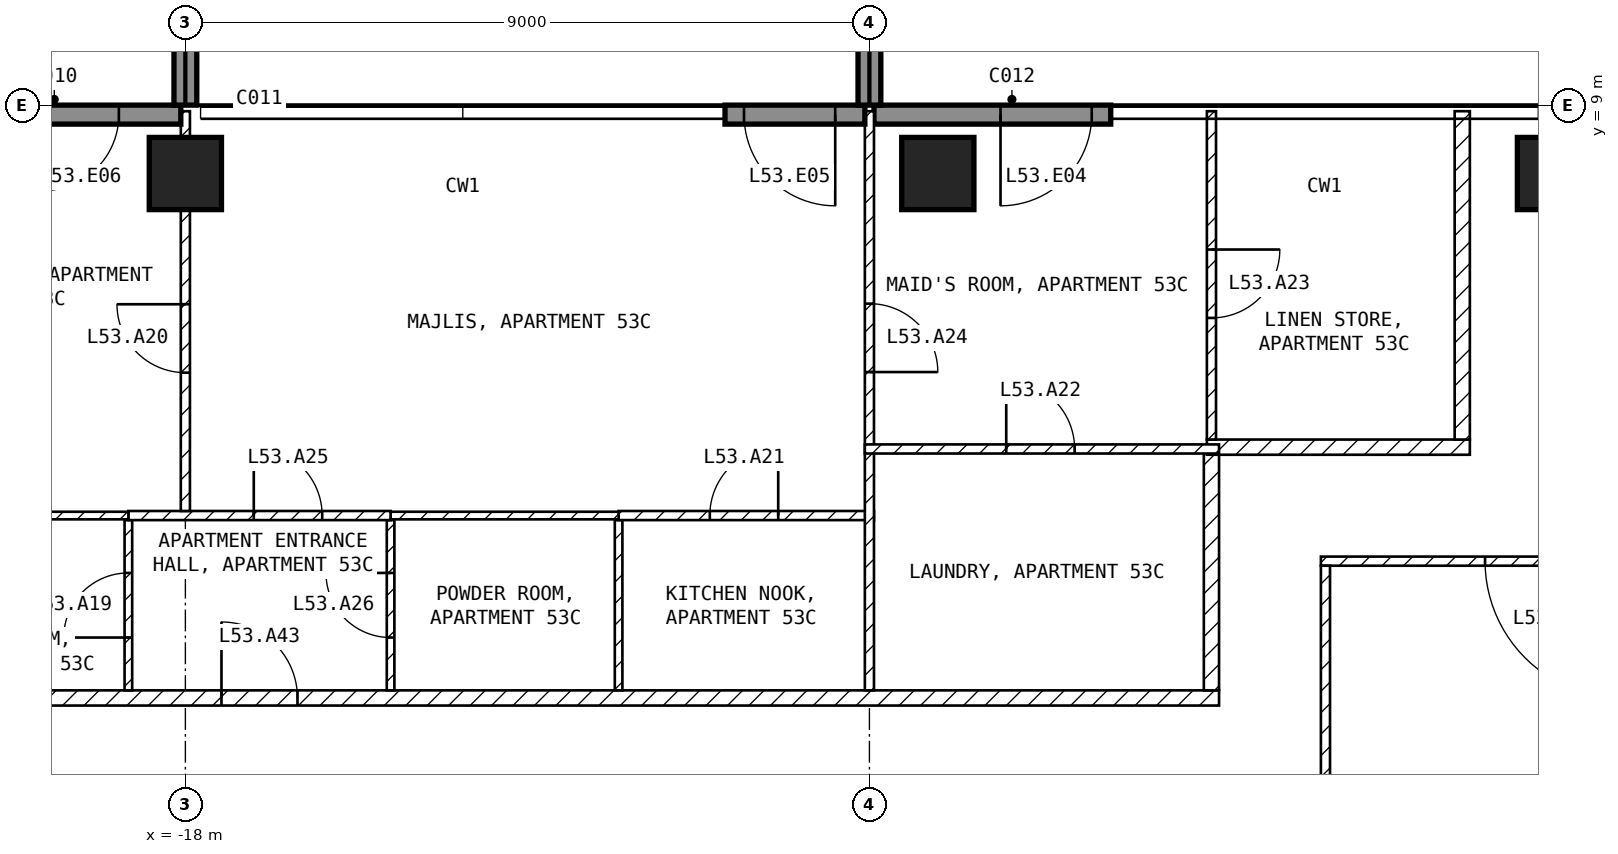
"""IFC4 building model, lengths in metres.
Left out: names, types, materials, properties, quantities, classifications, styles, units other than length and angle.
Written with IfcOpenShell. Run it as: python <this file> out.ifc"""

import sys

from ifc_helpers import new_model, si_unit, direction, frame, frame_2d, origin, origin_2d, place, context, subcontext, project, spatial, rectangle, extrude, element, fill, save


model = new_model("IFC4")
c1 = context("Model", 3, precision=1e-05, world=origin(), true_north=direction((0.0, 1.0)))
c2 = subcontext(c1, "Body", "Model", "MODEL_VIEW")
j1 = project(units=[si_unit("LENGTHUNIT", "METRE"), si_unit("PLANEANGLEUNIT", "RADIAN")], contexts=[c1])
p1 = place(None, origin())
s1 = spatial("IfcSite", under=j1, at=p1, CompositionType="ELEMENT")
p2 = place(p1, origin())
s2 = spatial("IfcBuilding", under=s1, at=p2, CompositionType="ELEMENT")
p3 = place(p2, frame((0.0, 0.0, 212.1)))
s3 = spatial("IfcBuildingStorey", under=s2, at=p3, CompositionType="ELEMENT", Elevation=212.1)
for number, where, z_axis, x_axis in (
    (1, (-18.0, 8.1, -0.25), (0.0, 0.0, 1.0), (1.0, 0.0, 0.0)),
    (2, (-8.1, 8.1, -0.25), (0.0, 0.0, 1.0), (1.0, 0.0, 0.0)),
    (3, (0.0, 8.1, -0.25), (0.0, 0.0, 1.0), (1.0, 0.0, 0.0)),
):
    element("IfcColumn", number, at=place(p3, frame(where, z_axis=z_axis, x_axis=x_axis)), inside=s3, PredefinedType="COLUMN", context=c2, shape_type="SweptSolid", body=[
        extrude(rectangle(XDim=0.95, YDim=0.95, at=origin_2d()), origin(), (0.0, 0.0, 1.0), 3.5),
    ])
p4 = place(p3, frame((-5.825, 8.875, 0.0), z_axis=(0.0, 0.0, 1.0), x_axis=(-1.0, 0.0, 0.0)))
e4 = element("IfcWall", 4, at=p4, inside=s3, PredefinedType="SOLIDWALL", context=c2, shape_type="SweptSolid", body=[
    extrude(rectangle(XDim=3.115, YDim=0.25, at=frame_2d((1.558, 0.0))), origin(), (0.0, 0.0, 1.0), 3.25),
])
p5 = place(p4, frame((0.25, 0.0, 0.0)))
e5 = element("IfcOpeningElement", 5, at=p5, cuts=e4, PredefinedType="OPENING", context=c2, shape_type="SweptSolid", body=[
    extrude(rectangle(XDim=1.2, YDim=2.4, at=frame_2d((0.6, 1.2))), frame((0.0, 0.135, 0.0), z_axis=(0.0, -1.0, 0.0), x_axis=(1.0, 0.0, 0.0)), (0.0, 0.0, 1.0), 0.27),
])
p6 = place(p3, frame((-9.06, 8.875, 0.0), z_axis=(0.0, 0.0, 1.0), x_axis=(-1.0, 0.0, 0.0)))
e6 = element("IfcWall", 6, at=p6, inside=s3, PredefinedType="SOLIDWALL", context=c2, shape_type="SweptSolid", body=[
    extrude(rectangle(XDim=1.84, YDim=0.25, at=frame_2d((0.92, 0.0))), origin(), (0.0, 0.0, 1.0), 3.25),
])
p7 = place(p6, frame((0.39, 0.0, 0.0)))
e7 = element("IfcOpeningElement", 7, at=p7, cuts=e6, PredefinedType="OPENING", context=c2, shape_type="SweptSolid", body=[
    extrude(rectangle(XDim=1.2, YDim=2.4, at=frame_2d((0.6, 1.2))), frame((0.0, 0.135, 0.0), z_axis=(0.0, -1.0, 0.0), x_axis=(1.0, 0.0, 0.0)), (0.0, 0.0, 1.0), 0.27),
])
p8 = place(p3, frame((-18.06, 8.875, 0.0), z_axis=(0.0, 0.0, 1.0), x_axis=(-1.0, 0.0, 0.0)))
e8 = element("IfcWall", 8, at=p8, inside=s3, PredefinedType="SOLIDWALL", context=c2, shape_type="SweptSolid", body=[
    extrude(rectangle(XDim=3.115, YDim=0.25, at=frame_2d((1.558, 0.0))), origin(), (0.0, 0.0, 1.0), 3.25),
])
p9 = place(p8, frame((0.815, 0.0, 0.0)))
e9 = element("IfcOpeningElement", 9, at=p9, cuts=e8, PredefinedType="OPENING", context=c2, shape_type="SweptSolid", body=[
    extrude(rectangle(XDim=1.0, YDim=2.4, at=frame_2d((0.5, 1.2))), frame((0.0, 0.135, 0.0), z_axis=(0.0, -1.0, 0.0), x_axis=(1.0, 0.0, 0.0)), (0.0, 0.0, 1.0), 0.27),
])
for number, where, z_axis, x_axis in (
    (10, (-18.0, 9.0, 0.0), (0.0, 0.0, 1.0), (0.0, 1.0, 0.0)),
    (11, (-9.0, 9.0, 0.0), (0.0, 0.0, 1.0), (0.0, 1.0, 0.0)),
):
    element("IfcWall", number, at=place(p3, frame(where, z_axis=z_axis, x_axis=x_axis)), inside=s3, PredefinedType="SOLIDWALL", context=c2, shape_type="SweptSolid", body=[
        extrude(rectangle(XDim=2.7, YDim=0.3, at=frame_2d((1.35, 0.0))), origin(), (0.0, 0.0, 1.0), 3.25),
    ])
p10 = place(p3, frame((3.06, 3.0, 0.0), z_axis=(0.0, 0.0, 1.0), x_axis=(-1.0, 0.0, 0.0)))
e12 = element("IfcWall", 12, at=p10, inside=s3, PredefinedType="PARTITIONING", context=c2, shape_type="SweptSolid", body=[
    extrude(rectangle(XDim=6.12, YDim=0.12, at=frame_2d((3.06, 0.0))), origin(), (0.0, 0.0, 1.0), 3.25),
])
p11 = place(p10, frame((2.16, 0.0, 0.0)))
e13 = element("IfcOpeningElement", 13, at=p11, cuts=e12, PredefinedType="OPENING", context=c2, shape_type="SweptSolid", body=[
    extrude(rectangle(XDim=1.8, YDim=2.1, at=frame_2d((0.9, 1.05))), frame((0.0, 0.07, 0.0), z_axis=(0.0, -1.0, 0.0), x_axis=(1.0, 0.0, 0.0)), (0.0, 0.0, 1.0), 0.14),
])
p12 = place(p3, frame((-3.0, 2.94, 0.0), z_axis=(0.0, 0.0, 1.0), x_axis=(0.0, -1.0, 0.0)))
e14 = element("IfcWall", 14, at=p12, inside=s3, PredefinedType="PARTITIONING", context=c2, shape_type="SweptSolid", body=[
    extrude(rectangle(XDim=5.88, YDim=0.12, at=frame_2d((2.94, 0.0))), origin(), (0.0, 0.0, 1.0), 3.25),
])
p13 = place(p3, frame((-21.6, 1.2, 0.0), z_axis=(0.0, 0.0, 1.0), x_axis=(1.0, 0.0, 0.0)))
e15 = element("IfcWall", 15, at=p13, inside=s3, PredefinedType="PARTITIONING", context=c2, shape_type="SweptSolid", body=[
    extrude(rectangle(XDim=17.2, YDim=0.2, at=frame_2d((8.6, 0.0))), origin(), (0.0, 0.0, 1.0), 3.25),
])
p14 = place(p13, frame((4.075, 0.0, 0.0)))
e16 = element("IfcOpeningElement", 16, at=p14, cuts=e15, PredefinedType="OPENING", context=c2, shape_type="SweptSolid", body=[
    extrude(rectangle(XDim=1.0, YDim=2.1, at=frame_2d((0.5, 1.05))), frame((0.0, 0.11, 0.0), z_axis=(0.0, -1.0, 0.0), x_axis=(1.0, 0.0, 0.0)), (0.0, 0.0, 1.0), 0.22),
])
p15 = place(p3, frame((-4.5, 1.3, 0.0), z_axis=(0.0, 0.0, 1.0), x_axis=(0.0, 1.0, 0.0)))
e17 = element("IfcWall", 17, at=p15, inside=s3, PredefinedType="PARTITIONING", context=c2, shape_type="SweptSolid", body=[
    extrude(rectangle(XDim=3.116, YDim=0.2, at=frame_2d((1.558, 0.0))), origin(), (0.0, 0.0, 1.0), 3.25),
])
p16 = place(p3, frame((-4.56, 4.5, 0.0), z_axis=(0.0, 0.0, 1.0), x_axis=(1.0, 0.0, 0.0)))
e18 = element("IfcWall", 18, at=p16, inside=s3, PredefinedType="PARTITIONING", context=c2, shape_type="SweptSolid", body=[
    extrude(rectangle(XDim=3.46, YDim=0.2, at=frame_2d((1.73, 0.0))), origin(), (0.0, 0.0, 1.0), 3.25),
])
p17 = place(p3, frame((-1.2, 4.6, 0.0), z_axis=(0.0, 0.0, 1.0), x_axis=(0.0, 1.0, 0.0)))
e19 = element("IfcWall", 19, at=p17, inside=s3, PredefinedType="PARTITIONING", context=c2, shape_type="SweptSolid", body=[
    extrude(rectangle(XDim=4.32, YDim=0.2, at=frame_2d((2.16, 0.0))), origin(), (0.0, 0.0, 1.0), 3.25),
])
p18 = place(p3, frame((-12.3, 1.3, 0.0), z_axis=(0.0, 0.0, 1.0), x_axis=(0.0, 1.0, 0.0)))
e20 = element("IfcWall", 20, at=p18, inside=s3, PredefinedType="PARTITIONING", context=c2, shape_type="SweptSolid", body=[
    extrude(rectangle(XDim=2.24, YDim=0.1, at=frame_2d((1.12, 0.0))), origin(), (0.0, 0.0, 1.0), 3.25),
])
p19 = place(p3, frame((-12.3, 3.6, 0.0), z_axis=(0.0, 0.0, 1.0), x_axis=(1.0, 0.0, 0.0)))
e21 = element("IfcWall", 21, at=p19, inside=s3, PredefinedType="PARTITIONING", context=c2, shape_type="SweptSolid", body=[
    extrude(rectangle(XDim=3.36, YDim=0.12, at=frame_2d((1.68, 0.0))), origin(), (0.0, 0.0, 1.0), 3.25),
])
p20 = place(p19, frame((1.2, 0.0, 0.0)))
e22 = element("IfcOpeningElement", 22, at=p20, cuts=e21, PredefinedType="OPENING", context=c2, shape_type="SweptSolid", body=[
    extrude(rectangle(XDim=0.9, YDim=2.1, at=frame_2d((0.45, 1.05))), frame((0.0, 0.07, 0.0), z_axis=(0.0, -1.0, 0.0), x_axis=(1.0, 0.0, 0.0)), (0.0, 0.0, 1.0), 0.14),
])
p21 = place(p3, frame((-9.0, 8.92, 0.0), z_axis=(0.0, 0.0, 1.0), x_axis=(0.0, -1.0, 0.0)))
e23 = element("IfcWall", 23, at=p21, inside=s3, PredefinedType="PARTITIONING", context=c2, shape_type="SweptSolid", body=[
    extrude(rectangle(XDim=7.62, YDim=0.12, at=frame_2d((3.81, 0.0))), origin(), (0.0, 0.0, 1.0), 3.25),
])
p22 = place(p21, frame((2.532, 0.0, 0.0)))
e24 = element("IfcOpeningElement", 24, at=p22, cuts=e23, PredefinedType="OPENING", context=c2, shape_type="SweptSolid", body=[
    extrude(rectangle(XDim=0.9, YDim=2.1, at=frame_2d((0.45, 1.05))), frame((0.0, 0.07, 0.0), z_axis=(0.0, -1.0, 0.0), x_axis=(1.0, 0.0, 0.0)), (0.0, 0.0, 1.0), 0.14),
])
p23 = place(p3, frame((-15.3, 1.3, 0.0), z_axis=(0.0, 0.0, 1.0), x_axis=(0.0, 1.0, 0.0)))
e25 = element("IfcWall", 25, at=p23, inside=s3, PredefinedType="PARTITIONING", context=c2, shape_type="SweptSolid", body=[
    extrude(rectangle(XDim=2.24, YDim=0.1, at=frame_2d((1.12, 0.0))), origin(), (0.0, 0.0, 1.0), 3.25),
])
p24 = place(p23, frame((0.695, 0.0, 0.0)))
e26 = element("IfcOpeningElement", 26, at=p24, cuts=e25, PredefinedType="OPENING", context=c2, shape_type="SweptSolid", body=[
    extrude(rectangle(XDim=0.85, YDim=2.1, at=frame_2d((0.425, 1.05))), frame((0.0, 0.06, 0.0), z_axis=(0.0, -1.0, 0.0), x_axis=(1.0, 0.0, 0.0)), (0.0, 0.0, 1.0), 0.12),
])
p25 = place(p3, frame((-15.3, 3.6, 0.0), z_axis=(0.0, 0.0, 1.0), x_axis=(1.0, 0.0, 0.0)))
e27 = element("IfcWall", 27, at=p25, inside=s3, PredefinedType="PARTITIONING", context=c2, shape_type="SweptSolid", body=[
    extrude(rectangle(XDim=3.0, YDim=0.1, at=frame_2d((1.5, 0.0))), origin(), (0.0, 0.0, 1.0), 3.25),
])
p26 = place(p3, frame((-18.75, 1.3, 0.0), z_axis=(0.0, 0.0, 1.0), x_axis=(0.0, 1.0, 0.0)))
e28 = element("IfcWall", 28, at=p26, inside=s3, PredefinedType="PARTITIONING", context=c2, shape_type="SweptSolid", body=[
    extrude(rectangle(XDim=2.24, YDim=0.1, at=frame_2d((1.12, 0.0))), origin(), (0.0, 0.0, 1.0), 3.25),
])
p27 = place(p26, frame((0.695, 0.0, 0.0)))
e29 = element("IfcOpeningElement", 29, at=p27, cuts=e28, PredefinedType="OPENING", context=c2, shape_type="SweptSolid", body=[
    extrude(rectangle(XDim=0.85, YDim=2.1, at=frame_2d((0.425, 1.05))), frame((0.0, 0.06, 0.0), z_axis=(0.0, -1.0, 0.0), x_axis=(1.0, 0.0, 0.0)), (0.0, 0.0, 1.0), 0.12),
])
p28 = place(p3, frame((-18.75, 3.6, 0.0), z_axis=(0.0, 0.0, 1.0), x_axis=(1.0, 0.0, 0.0)))
e30 = element("IfcWall", 30, at=p28, inside=s3, PredefinedType="PARTITIONING", context=c2, shape_type="SweptSolid", body=[
    extrude(rectangle(XDim=3.45, YDim=0.12, at=frame_2d((1.725, 0.0))), origin(), (0.0, 0.0, 1.0), 3.25),
])
p29 = place(p28, frame((1.65, 0.0, 0.0)))
e31 = element("IfcOpeningElement", 31, at=p29, cuts=e30, PredefinedType="OPENING", context=c2, shape_type="SweptSolid", body=[
    extrude(rectangle(XDim=0.9, YDim=2.1, at=frame_2d((0.45, 1.05))), frame((0.0, 0.07, 0.0), z_axis=(0.0, -1.0, 0.0), x_axis=(1.0, 0.0, 0.0)), (0.0, 0.0, 1.0), 0.14),
])
p30 = place(p3, frame((-21.6, 3.6, 0.0), z_axis=(0.0, 0.0, 1.0), x_axis=(1.0, 0.0, 0.0)))
e32 = element("IfcWall", 32, at=p30, inside=s3, PredefinedType="PARTITIONING", context=c2, shape_type="SweptSolid", body=[
    extrude(rectangle(XDim=2.85, YDim=0.1, at=frame_2d((1.425, 0.0))), origin(), (0.0, 0.0, 1.0), 3.25),
])
p31 = place(p3, frame((-18.0, 3.66, 0.0), z_axis=(0.0, 0.0, 1.0), x_axis=(0.0, 1.0, 0.0)))
e33 = element("IfcWall", 33, at=p31, inside=s3, PredefinedType="PARTITIONING", context=c2, shape_type="SweptSolid", body=[
    extrude(rectangle(XDim=5.26, YDim=0.12, at=frame_2d((2.63, 0.0))), origin(), (0.0, 0.0, 1.0), 2.48),
])
p32 = place(p31, frame((1.82, 0.0, 0.0)))
e34 = element("IfcOpeningElement", 34, at=p32, cuts=e33, PredefinedType="OPENING", context=c2, shape_type="SweptSolid", body=[
    extrude(rectangle(XDim=0.9, YDim=2.1, at=frame_2d((0.45, 1.05))), frame((0.0, 0.07, 0.0), z_axis=(0.0, -1.0, 0.0), x_axis=(1.0, 0.0, 0.0)), (0.0, 0.0, 1.0), 0.14),
])
p33 = place(p3, frame((-9.06, 4.476, 0.0), z_axis=(0.0, 0.0, 1.0), x_axis=(1.0, 0.0, 0.0)))
e35 = element("IfcWall", 35, at=p33, inside=s3, PredefinedType="PARTITIONING", context=c2, shape_type="SweptSolid", body=[
    extrude(rectangle(XDim=4.66, YDim=0.12, at=frame_2d((2.33, 0.0))), origin(), (0.0, 0.0, 1.0), 3.25),
])
p34 = place(p33, frame((1.86, 0.0, 0.0)))
e36 = element("IfcOpeningElement", 36, at=p34, cuts=e35, PredefinedType="OPENING", context=c2, shape_type="SweptSolid", body=[
    extrude(rectangle(XDim=0.9, YDim=2.1, at=frame_2d((0.45, 1.05))), frame((0.0, 0.07, 0.0), z_axis=(0.0, -1.0, 0.0), x_axis=(1.0, 0.0, 0.0)), (0.0, 0.0, 1.0), 0.14),
])
p35 = place(p3, frame((-4.5, 8.92, 0.0), z_axis=(0.0, 0.0, 1.0), x_axis=(0.0, -1.0, 0.0)))
e37 = element("IfcWall", 37, at=p35, inside=s3, PredefinedType="PARTITIONING", context=c2, shape_type="SweptSolid", body=[
    extrude(rectangle(XDim=4.32, YDim=0.12, at=frame_2d((2.16, 0.0))), origin(), (0.0, 0.0, 1.0), 3.25),
])
p36 = place(p35, frame((1.82, 0.0, 0.0)))
e38 = element("IfcOpeningElement", 38, at=p36, cuts=e37, PredefinedType="OPENING", context=c2, shape_type="SweptSolid", body=[
    extrude(rectangle(XDim=0.9, YDim=2.1, at=frame_2d((0.45, 1.05))), frame((0.0, 0.07, 0.0), z_axis=(0.0, -1.0, 0.0), x_axis=(1.0, 0.0, 0.0)), (0.0, 0.0, 1.0), 0.14),
])
p37 = place(p5, origin())
e39 = element("IfcDoor", 39, at=p37, inside=s3, OperationType="SINGLE_SWING_RIGHT", PredefinedType="DOOR", context=c2, shape_type="SweptSolid", body=[
    extrude(rectangle(XDim=1.2, YDim=2.4, at=frame_2d((0.6, 1.2))), frame((0.0, 0.025, 0.0), z_axis=(0.0, -1.0, 0.0), x_axis=(1.0, 0.0, 0.0)), (0.0, 0.0, 1.0), 0.05),
])
fill(e5, e39)
p38 = place(p7, origin())
e40 = element("IfcDoor", 40, at=p38, inside=s3, OperationType="SINGLE_SWING_LEFT", PredefinedType="DOOR", context=c2, shape_type="SweptSolid", body=[
    extrude(rectangle(XDim=1.2, YDim=2.4, at=frame_2d((0.6, 1.2))), frame((0.0, 0.025, 0.0), z_axis=(0.0, -1.0, 0.0), x_axis=(1.0, 0.0, 0.0)), (0.0, 0.0, 1.0), 0.05),
])
fill(e7, e40)
p39 = place(p9, origin())
e41 = element("IfcDoor", 41, at=p39, inside=s3, OperationType="SINGLE_SWING_RIGHT", PredefinedType="DOOR", context=c2, shape_type="SweptSolid", body=[
    extrude(rectangle(XDim=1.0, YDim=2.4, at=frame_2d((0.5, 1.2))), frame((0.0, 0.025, 0.0), z_axis=(0.0, -1.0, 0.0), x_axis=(1.0, 0.0, 0.0)), (0.0, 0.0, 1.0), 0.05),
])
fill(e9, e41)
p40 = place(p11, origin())
e42 = element("IfcDoor", 42, at=p40, inside=s3, OperationType="SINGLE_SWING_LEFT", PredefinedType="DOOR", context=c2, shape_type="SweptSolid", body=[
    extrude(rectangle(XDim=1.8, YDim=2.1, at=frame_2d((0.9, 1.05))), frame((0.0, 0.025, 0.0), z_axis=(0.0, -1.0, 0.0), x_axis=(1.0, 0.0, 0.0)), (0.0, 0.0, 1.0), 0.05),
])
fill(e13, e42)
p41 = place(p27, origin())
e43 = element("IfcDoor", 43, at=p41, inside=s3, OperationType="SINGLE_SWING_LEFT", PredefinedType="DOOR", context=c2, shape_type="SweptSolid", body=[
    extrude(rectangle(XDim=0.85, YDim=2.1, at=frame_2d((0.425, 1.05))), frame((0.0, 0.025, 0.0), z_axis=(0.0, -1.0, 0.0), x_axis=(1.0, 0.0, 0.0)), (0.0, 0.0, 1.0), 0.05),
])
fill(e29, e43)
p42 = place(p32, origin())
e44 = element("IfcDoor", 44, at=p42, inside=s3, OperationType="SINGLE_SWING_RIGHT", PredefinedType="DOOR", context=c2, shape_type="SweptSolid", body=[
    extrude(rectangle(XDim=0.9, YDim=2.1, at=frame_2d((0.45, 1.05))), frame((0.0, 0.025, 0.0), z_axis=(0.0, -1.0, 0.0), x_axis=(1.0, 0.0, 0.0)), (0.0, 0.0, 1.0), 0.05),
])
fill(e34, e44)
p43 = place(p20, origin())
e45 = element("IfcDoor", 45, at=p43, inside=s3, OperationType="SINGLE_SWING_RIGHT", PredefinedType="DOOR", context=c2, shape_type="SweptSolid", body=[
    extrude(rectangle(XDim=0.9, YDim=2.1, at=frame_2d((0.45, 1.05))), frame((0.0, 0.025, 0.0), z_axis=(0.0, -1.0, 0.0), x_axis=(1.0, 0.0, 0.0)), (0.0, 0.0, 1.0), 0.05),
])
fill(e22, e45)
p44 = place(p34, origin())
e46 = element("IfcDoor", 46, at=p44, inside=s3, OperationType="SINGLE_SWING_LEFT", PredefinedType="DOOR", context=c2, shape_type="SweptSolid", body=[
    extrude(rectangle(XDim=0.9, YDim=2.1, at=frame_2d((0.45, 1.05))), frame((0.0, 0.025, 0.0), z_axis=(0.0, -1.0, 0.0), x_axis=(1.0, 0.0, 0.0)), (0.0, 0.0, 1.0), 0.05),
])
fill(e36, e46)
p45 = place(p36, origin())
e47 = element("IfcDoor", 47, at=p45, inside=s3, OperationType="SINGLE_SWING_LEFT", PredefinedType="DOOR", context=c2, shape_type="SweptSolid", body=[
    extrude(rectangle(XDim=0.9, YDim=2.1, at=frame_2d((0.45, 1.05))), frame((0.0, 0.025, 0.0), z_axis=(0.0, -1.0, 0.0), x_axis=(1.0, 0.0, 0.0)), (0.0, 0.0, 1.0), 0.05),
])
fill(e38, e47)
p46 = place(p22, origin())
e48 = element("IfcDoor", 48, at=p46, inside=s3, OperationType="SINGLE_SWING_RIGHT", PredefinedType="DOOR", context=c2, shape_type="SweptSolid", body=[
    extrude(rectangle(XDim=0.9, YDim=2.1, at=frame_2d((0.45, 1.05))), frame((0.0, 0.025, 0.0), z_axis=(0.0, -1.0, 0.0), x_axis=(1.0, 0.0, 0.0)), (0.0, 0.0, 1.0), 0.05),
])
fill(e24, e48)
p47 = place(p29, origin())
e49 = element("IfcDoor", 49, at=p47, inside=s3, OperationType="SINGLE_SWING_LEFT", PredefinedType="DOOR", context=c2, shape_type="SweptSolid", body=[
    extrude(rectangle(XDim=0.9, YDim=2.1, at=frame_2d((0.45, 1.05))), frame((0.0, 0.025, 0.0), z_axis=(0.0, -1.0, 0.0), x_axis=(1.0, 0.0, 0.0)), (0.0, 0.0, 1.0), 0.05),
])
fill(e31, e49)
p48 = place(p24, origin())
e50 = element("IfcDoor", 50, at=p48, inside=s3, OperationType="SINGLE_SWING_RIGHT", PredefinedType="DOOR", context=c2, shape_type="SweptSolid", body=[
    extrude(rectangle(XDim=0.85, YDim=2.1, at=frame_2d((0.425, 1.05))), frame((0.0, 0.025, 0.0), z_axis=(0.0, -1.0, 0.0), x_axis=(1.0, 0.0, 0.0)), (0.0, 0.0, 1.0), 0.05),
])
fill(e26, e50)
p49 = place(p14, origin())
e51 = element("IfcDoor", 51, at=p49, inside=s3, OperationType="SINGLE_SWING_LEFT", PredefinedType="DOOR", context=c2, shape_type="SweptSolid", body=[
    extrude(rectangle(XDim=1.0, YDim=2.1, at=frame_2d((0.5, 1.05))), frame((0.0, 0.025, 0.0), z_axis=(0.0, -1.0, 0.0), x_axis=(1.0, 0.0, 0.0)), (0.0, 0.0, 1.0), 0.05),
])
fill(e16, e51)
save(model, sys.argv[1])
